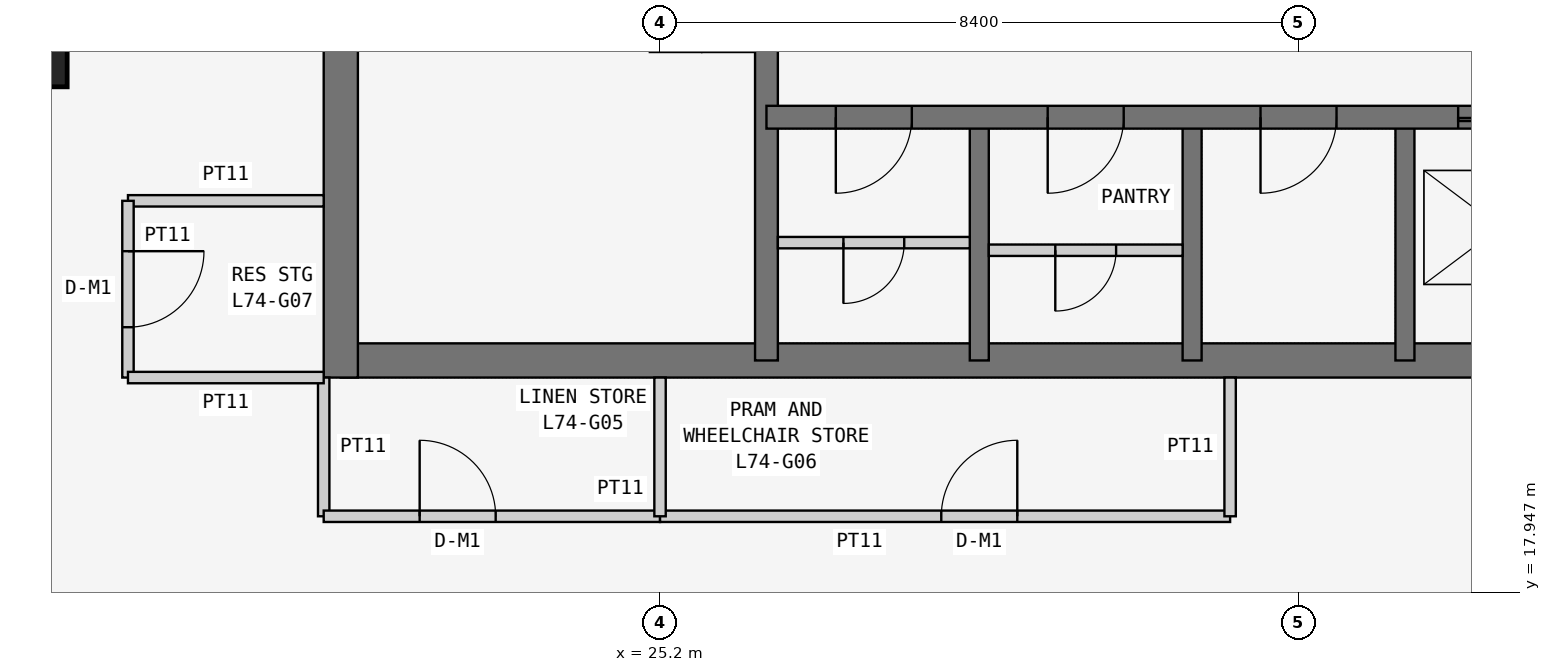
"""IFC4 building model, lengths in metres.
Left out: names, types, materials, properties, quantities, classifications, styles, units other than length and angle.
Written with IfcOpenShell. Run it as: python <this file> out.ifc"""

import sys

from ifc_helpers import new_model, si_unit, direction, frame, frame_2d, origin, origin_2d, place, context, subcontext, project, spatial, rectangle, extrude, element, fill, save


model = new_model("IFC4")
c1 = context("Model", 3, precision=1e-05, world=origin(), true_north=direction((0.0, 1.0)))
c2 = subcontext(c1, "Body", "Model", "MODEL_VIEW")
j1 = project(units=[si_unit("LENGTHUNIT", "METRE"), si_unit("PLANEANGLEUNIT", "RADIAN")], contexts=[c1])
p1 = place(None, origin())
s1 = spatial("IfcSite", under=j1, at=p1, CompositionType="ELEMENT")
p2 = place(p1, origin())
s2 = spatial("IfcBuilding", under=s1, at=p2, CompositionType="ELEMENT")
p3 = place(p2, frame((0.0, 0.0, 282.9)))
s3 = spatial("IfcBuildingStorey", under=s2, at=p3, CompositionType="ELEMENT", Elevation=282.9)
p4 = place(p3, frame((16.8, 25.2, 0.0), z_axis=(0.0, 0.0, 1.0), x_axis=(1.0, 0.0, 0.0)))
e1 = element("IfcColumn", 1, at=p4, inside=s3, PredefinedType="COLUMN", context=c2, shape_type="SweptSolid", body=[
    extrude(rectangle(XDim=1.2, YDim=1.2, at=origin_2d()), origin(), (0.0, 0.0, 1.0), 3.6),
])
p5 = place(p3, frame((21.0, 21.0, 0.0), z_axis=(0.0, 0.0, 1.0), x_axis=(1.0, 0.0, 0.0)))
e2 = element("IfcWall", 2, at=p5, inside=s3, PredefinedType="SHEAR", context=c2, shape_type="SweptSolid", body=[
    extrude(rectangle(XDim=17.025, YDim=0.45, at=frame_2d((8.512, 0.0))), origin(), (0.0, 0.0, 1.0), 3.6),
])
p6 = place(p3, frame((21.0, 37.8, 0.0), z_axis=(0.0, 0.0, 1.0), x_axis=(0.0, -1.0, 0.0)))
e3 = element("IfcWall", 3, at=p6, inside=s3, PredefinedType="SHEAR", context=c2, shape_type="SweptSolid", body=[
    extrude(rectangle(XDim=17.025, YDim=0.45, at=frame_2d((8.513, 0.0))), origin(), (0.0, 0.0, 1.0), 3.6),
])
p7 = place(p6, frame((5.4, 0.0, 0.0)))
e4 = element("IfcOpeningElement", 4, at=p7, cuts=e3, PredefinedType="OPENING", context=c2, shape_type="SweptSolid", body=[
    extrude(rectangle(XDim=1.2, YDim=2.1, at=frame_2d((0.6, 1.05))), frame((0.0, 0.235, 0.0), z_axis=(0.0, -1.0, 0.0), x_axis=(1.0, 0.0, 0.0)), (0.0, 0.0, 1.0), 0.47),
])
p8 = place(p3, frame((26.6, 21.0, 0.0), z_axis=(0.0, 0.0, 1.0), x_axis=(0.0, 1.0, 0.0)))
e5 = element("IfcWall", 5, at=p8, inside=s3, PredefinedType="SHEAR", context=c2, shape_type="SweptSolid", body=[
    extrude(rectangle(XDim=16.8, YDim=0.3, at=frame_2d((8.4, 0.0))), origin(), (0.0, 0.0, 1.0), 3.6),
])
p9 = place(p8, frame((10.4, 0.0, 0.0)))
e6 = element("IfcOpeningElement", 6, at=p9, cuts=e5, PredefinedType="OPENING", context=c2, shape_type="SweptSolid", body=[
    extrude(rectangle(XDim=1.2, YDim=2.1, at=frame_2d((0.6, 1.05))), frame((0.0, 0.16, 0.0), z_axis=(0.0, -1.0, 0.0), x_axis=(1.0, 0.0, 0.0)), (0.0, 0.0, 1.0), 0.32),
])
p10 = place(p3, frame((26.6, 24.2, 0.0), z_axis=(0.0, 0.0, 1.0), x_axis=(1.0, 0.0, 0.0)))
e7 = element("IfcWall", 7, at=p10, inside=s3, PredefinedType="SHEAR", context=c2, shape_type="SweptSolid", body=[
    extrude(rectangle(XDim=11.2, YDim=0.3, at=frame_2d((5.6, 0.0))), origin(), (0.0, 0.0, 1.0), 3.6),
])
p11 = place(p10, frame((0.913, 0.0, 0.0)))
e8 = element("IfcOpeningElement", 8, at=p11, cuts=e7, PredefinedType="OPENING", context=c2, shape_type="SweptSolid", body=[
    extrude(rectangle(XDim=1.0, YDim=2.1, at=frame_2d((0.5, 1.05))), frame((0.0, 0.16, 0.0), z_axis=(0.0, -1.0, 0.0), x_axis=(1.0, 0.0, 0.0)), (0.0, 0.0, 1.0), 0.32),
])
p12 = place(p10, frame((3.7, 0.0, 0.0)))
e9 = element("IfcOpeningElement", 9, at=p12, cuts=e7, PredefinedType="OPENING", context=c2, shape_type="SweptSolid", body=[
    extrude(rectangle(XDim=1.0, YDim=2.1, at=frame_2d((0.5, 1.05))), frame((0.0, 0.16, 0.0), z_axis=(0.0, -1.0, 0.0), x_axis=(1.0, 0.0, 0.0)), (0.0, 0.0, 1.0), 0.32),
])
p13 = place(p10, frame((6.5, 0.0, 0.0)))
e10 = element("IfcOpeningElement", 10, at=p13, cuts=e7, PredefinedType="OPENING", context=c2, shape_type="SweptSolid", body=[
    extrude(rectangle(XDim=1.0, YDim=2.1, at=frame_2d((0.5, 1.05))), frame((0.0, 0.16, 0.0), z_axis=(0.0, -1.0, 0.0), x_axis=(1.0, 0.0, 0.0)), (0.0, 0.0, 1.0), 0.32),
])
p14 = place(p10, frame((9.1, 0.0, 0.0)))
e11 = element("IfcOpeningElement", 11, at=p14, cuts=e7, PredefinedType="OPENING", context=c2, shape_type="SweptSolid", body=[
    extrude(rectangle(XDim=1.1, YDim=2.1, at=frame_2d((0.55, 1.05))), frame((0.0, 0.16, 0.0), z_axis=(0.0, -1.0, 0.0), x_axis=(1.0, 0.0, 0.0)), (0.0, 0.0, 1.0), 0.32),
])
for number, where, z_axis, x_axis in (
    (12, (29.4, 21.0, 0.0), (0.0, 0.0, 1.0), (0.0, 1.0, 0.0)),
    (13, (32.2, 21.0, 0.0), (0.0, 0.0, 1.0), (0.0, 1.0, 0.0)),
    (14, (35.0, 21.0, 0.0), (0.0, 0.0, 1.0), (0.0, 1.0, 0.0)),
):
    element("IfcWall", number, at=place(p3, frame(where, z_axis=z_axis, x_axis=x_axis)), inside=s3, PredefinedType="SHEAR", context=c2, shape_type="SweptSolid", body=[
        extrude(rectangle(XDim=3.2, YDim=0.25, at=frame_2d((1.6, 0.0))), origin(), (0.0, 0.0, 1.0), 3.6),
    ])
p15 = place(p3, frame((20.775, 20.775, 0.0), z_axis=(0.0, 0.0, 1.0), x_axis=(0.0, -1.0, 0.0)))
e15 = element("IfcWall", 15, at=p15, inside=s3, PredefinedType="PARTITIONING", context=c2, shape_type="SweptSolid", body=[
    extrude(rectangle(XDim=1.825, YDim=0.15, at=frame_2d((0.913, 0.0))), origin(), (0.0, 0.0, 1.0), 3.45),
])
p16 = place(p3, frame((20.775, 18.95, 0.0), z_axis=(0.0, 0.0, 1.0), x_axis=(1.0, 0.0, 0.0)))
e16 = element("IfcWall", 16, at=p16, inside=s3, PredefinedType="PARTITIONING", context=c2, shape_type="SweptSolid", body=[
    extrude(rectangle(XDim=4.425, YDim=0.15, at=frame_2d((2.212, 0.0))), origin(), (0.0, 0.0, 1.0), 3.45),
])
p17 = place(p16, frame((1.262, 0.0, 0.0)))
e17 = element("IfcOpeningElement", 17, at=p17, cuts=e16, PredefinedType="OPENING", context=c2, shape_type="SweptSolid", body=[
    extrude(rectangle(XDim=1.0, YDim=2.1, at=frame_2d((0.5, 1.05))), frame((0.0, 0.085, 0.0), z_axis=(0.0, -1.0, 0.0), x_axis=(1.0, 0.0, 0.0)), (0.0, 0.0, 1.0), 0.17),
])
p18 = place(p3, frame((25.2, 18.95, 0.0), z_axis=(0.0, 0.0, 1.0), x_axis=(1.0, 0.0, 0.0)))
e18 = element("IfcWall", 18, at=p18, inside=s3, PredefinedType="PARTITIONING", context=c2, shape_type="SweptSolid", body=[
    extrude(rectangle(XDim=7.5, YDim=0.15, at=frame_2d((3.75, 0.0))), origin(), (0.0, 0.0, 1.0), 3.45),
])
p19 = place(p18, frame((3.7, 0.0, 0.0)))
e19 = element("IfcOpeningElement", 19, at=p19, cuts=e18, PredefinedType="OPENING", context=c2, shape_type="SweptSolid", body=[
    extrude(rectangle(XDim=1.0, YDim=2.1, at=frame_2d((0.5, 1.05))), frame((0.0, 0.085, 0.0), z_axis=(0.0, -1.0, 0.0), x_axis=(1.0, 0.0, 0.0)), (0.0, 0.0, 1.0), 0.17),
])
p20 = place(p3, frame((32.7, 18.95, 0.0), z_axis=(0.0, 0.0, 1.0), x_axis=(0.0, 1.0, 0.0)))
e20 = element("IfcWall", 20, at=p20, inside=s3, PredefinedType="PARTITIONING", context=c2, shape_type="SweptSolid", body=[
    extrude(rectangle(XDim=1.825, YDim=0.15, at=frame_2d((0.913, 0.0))), origin(), (0.0, 0.0, 1.0), 3.45),
])
p21 = place(p3, frame((20.775, 23.1, 0.0), z_axis=(0.0, 0.0, 1.0), x_axis=(-1.0, 0.0, 0.0)))
e21 = element("IfcWall", 21, at=p21, inside=s3, PredefinedType="PARTITIONING", context=c2, shape_type="SweptSolid", body=[
    extrude(rectangle(XDim=2.575, YDim=0.15, at=frame_2d((1.288, 0.0))), origin(), (0.0, 0.0, 1.0), 3.45),
])
p22 = place(p3, frame((18.2, 23.1, 0.0), z_axis=(0.0, 0.0, 1.0), x_axis=(0.0, -1.0, 0.0)))
e22 = element("IfcWall", 22, at=p22, inside=s3, PredefinedType="PARTITIONING", context=c2, shape_type="SweptSolid", body=[
    extrude(rectangle(XDim=2.325, YDim=0.15, at=frame_2d((1.163, 0.0))), origin(), (0.0, 0.0, 1.0), 3.45),
])
p23 = place(p22, frame((0.663, 0.0, 0.0)))
e23 = element("IfcOpeningElement", 23, at=p23, cuts=e22, PredefinedType="OPENING", context=c2, shape_type="SweptSolid", body=[
    extrude(rectangle(XDim=1.0, YDim=2.1, at=frame_2d((0.5, 1.05))), frame((0.0, 0.085, 0.0), z_axis=(0.0, -1.0, 0.0), x_axis=(1.0, 0.0, 0.0)), (0.0, 0.0, 1.0), 0.17),
])
p24 = place(p3, frame((18.2, 20.775, 0.0), z_axis=(0.0, 0.0, 1.0), x_axis=(1.0, 0.0, 0.0)))
e24 = element("IfcWall", 24, at=p24, inside=s3, PredefinedType="PARTITIONING", context=c2, shape_type="SweptSolid", body=[
    extrude(rectangle(XDim=2.575, YDim=0.15, at=frame_2d((1.288, 0.0))), origin(), (0.0, 0.0, 1.0), 3.45),
])
p25 = place(p3, frame((25.2, 18.95, 0.0), z_axis=(0.0, 0.0, 1.0), x_axis=(0.0, 1.0, 0.0)))
e25 = element("IfcWall", 25, at=p25, inside=s3, PredefinedType="PARTITIONING", context=c2, shape_type="SweptSolid", body=[
    extrude(rectangle(XDim=1.825, YDim=0.15, at=frame_2d((0.913, 0.0))), origin(), (0.0, 0.0, 1.0), 2.767),
])
p26 = place(p3, frame((26.75, 22.55, 0.0), z_axis=(0.0, 0.0, 1.0), x_axis=(1.0, 0.0, 0.0)))
e26 = element("IfcWall", 26, at=p26, inside=s3, PredefinedType="PARTITIONING", context=c2, shape_type="SweptSolid", body=[
    extrude(rectangle(XDim=2.525, YDim=0.15, at=frame_2d((1.262, 0.0))), origin(), (0.0, 0.0, 1.0), 3.45),
])
p27 = place(p26, frame((0.863, 0.0, 0.0)))
e27 = element("IfcOpeningElement", 27, at=p27, cuts=e26, PredefinedType="OPENING", context=c2, shape_type="SweptSolid", body=[
    extrude(rectangle(XDim=0.8, YDim=2.1, at=frame_2d((0.4, 1.05))), frame((0.0, 0.085, 0.0), z_axis=(0.0, -1.0, 0.0), x_axis=(1.0, 0.0, 0.0)), (0.0, 0.0, 1.0), 0.17),
])
p28 = place(p3, frame((29.525, 22.45, 0.0), z_axis=(0.0, 0.0, 1.0), x_axis=(1.0, 0.0, 0.0)))
e28 = element("IfcWall", 28, at=p28, inside=s3, PredefinedType="PARTITIONING", context=c2, shape_type="SweptSolid", body=[
    extrude(rectangle(XDim=2.55, YDim=0.15, at=frame_2d((1.275, 0.0))), origin(), (0.0, 0.0, 1.0), 3.45),
])
p29 = place(p28, frame((0.875, 0.0, 0.0)))
e29 = element("IfcOpeningElement", 29, at=p29, cuts=e28, PredefinedType="OPENING", context=c2, shape_type="SweptSolid", body=[
    extrude(rectangle(XDim=0.8, YDim=2.1, at=frame_2d((0.4, 1.05))), frame((0.0, 0.085, 0.0), z_axis=(0.0, -1.0, 0.0), x_axis=(1.0, 0.0, 0.0)), (0.0, 0.0, 1.0), 0.17),
])
p30 = place(p17, origin())
e30 = element("IfcDoor", 30, at=p30, inside=s3, OperationType="SINGLE_SWING_LEFT", PredefinedType="DOOR", context=c2, shape_type="SweptSolid", body=[
    extrude(rectangle(XDim=1.0, YDim=2.1, at=frame_2d((0.5, 1.05))), frame((0.0, 0.025, 0.0), z_axis=(0.0, -1.0, 0.0), x_axis=(1.0, 0.0, 0.0)), (0.0, 0.0, 1.0), 0.05),
])
fill(e17, e30)
p31 = place(p19, origin())
e31 = element("IfcDoor", 31, at=p31, inside=s3, OperationType="SINGLE_SWING_RIGHT", PredefinedType="DOOR", context=c2, shape_type="SweptSolid", body=[
    extrude(rectangle(XDim=1.0, YDim=2.1, at=frame_2d((0.5, 1.05))), frame((0.0, 0.025, 0.0), z_axis=(0.0, -1.0, 0.0), x_axis=(1.0, 0.0, 0.0)), (0.0, 0.0, 1.0), 0.05),
])
fill(e19, e31)
p32 = place(p23, origin())
e32 = element("IfcDoor", 32, at=p32, inside=s3, OperationType="SINGLE_SWING_LEFT", PredefinedType="DOOR", context=c2, shape_type="SweptSolid", body=[
    extrude(rectangle(XDim=1.0, YDim=2.1, at=frame_2d((0.5, 1.05))), frame((0.0, 0.025, 0.0), z_axis=(0.0, -1.0, 0.0), x_axis=(1.0, 0.0, 0.0)), (0.0, 0.0, 1.0), 0.05),
])
fill(e23, e32)
p33 = place(p11, frame((1.0, 0.0, 0.0), z_axis=(0.0, 0.0, 1.0), x_axis=(-1.0, 0.0, 0.0)))
e33 = element("IfcDoor", 33, at=p33, inside=s3, OperationType="SINGLE_SWING_RIGHT", PredefinedType="DOOR", context=c2, shape_type="SweptSolid", body=[
    extrude(rectangle(XDim=1.0, YDim=2.1, at=frame_2d((0.5, 1.05))), frame((0.0, 0.025, 0.0), z_axis=(0.0, -1.0, 0.0), x_axis=(1.0, 0.0, 0.0)), (0.0, 0.0, 1.0), 0.05),
])
fill(e8, e33)
p34 = place(p27, frame((0.8, 0.0, 0.0), z_axis=(0.0, 0.0, 1.0), x_axis=(-1.0, 0.0, 0.0)))
e34 = element("IfcDoor", 34, at=p34, inside=s3, OperationType="SINGLE_SWING_RIGHT", PredefinedType="DOOR", context=c2, shape_type="SweptSolid", body=[
    extrude(rectangle(XDim=0.8, YDim=2.1, at=frame_2d((0.4, 1.05))), frame((0.0, 0.025, 0.0), z_axis=(0.0, -1.0, 0.0), x_axis=(1.0, 0.0, 0.0)), (0.0, 0.0, 1.0), 0.05),
])
fill(e27, e34)
p35 = place(p12, frame((1.0, 0.0, 0.0), z_axis=(0.0, 0.0, 1.0), x_axis=(-1.0, 0.0, 0.0)))
e35 = element("IfcDoor", 35, at=p35, inside=s3, OperationType="SINGLE_SWING_RIGHT", PredefinedType="DOOR", context=c2, shape_type="SweptSolid", body=[
    extrude(rectangle(XDim=1.0, YDim=2.1, at=frame_2d((0.5, 1.05))), frame((0.0, 0.025, 0.0), z_axis=(0.0, -1.0, 0.0), x_axis=(1.0, 0.0, 0.0)), (0.0, 0.0, 1.0), 0.05),
])
fill(e9, e35)
p36 = place(p29, frame((0.8, 0.0, 0.0), z_axis=(0.0, 0.0, 1.0), x_axis=(-1.0, 0.0, 0.0)))
e36 = element("IfcDoor", 36, at=p36, inside=s3, OperationType="SINGLE_SWING_RIGHT", PredefinedType="DOOR", context=c2, shape_type="SweptSolid", body=[
    extrude(rectangle(XDim=0.8, YDim=2.1, at=frame_2d((0.4, 1.05))), frame((0.0, 0.025, 0.0), z_axis=(0.0, -1.0, 0.0), x_axis=(1.0, 0.0, 0.0)), (0.0, 0.0, 1.0), 0.05),
])
fill(e29, e36)
p37 = place(p13, frame((1.0, 0.0, 0.0), z_axis=(0.0, 0.0, 1.0), x_axis=(-1.0, 0.0, 0.0)))
e37 = element("IfcDoor", 37, at=p37, inside=s3, OperationType="SINGLE_SWING_RIGHT", PredefinedType="DOOR", context=c2, shape_type="SweptSolid", body=[
    extrude(rectangle(XDim=1.0, YDim=2.1, at=frame_2d((0.5, 1.05))), frame((0.0, 0.025, 0.0), z_axis=(0.0, -1.0, 0.0), x_axis=(1.0, 0.0, 0.0)), (0.0, 0.0, 1.0), 0.05),
])
fill(e10, e37)
p38 = place(p14, origin())
e38 = element("IfcDoor", 38, at=p38, inside=s3, OperationType="DOUBLE_DOOR_SLIDING", PredefinedType="DOOR", context=c2, shape_type="SweptSolid", body=[
    extrude(rectangle(XDim=1.1, YDim=2.1, at=frame_2d((0.55, 1.05))), frame((0.0, 0.025, 0.0), z_axis=(0.0, -1.0, 0.0), x_axis=(1.0, 0.0, 0.0)), (0.0, 0.0, 1.0), 0.05),
])
fill(e11, e38)
save(model, sys.argv[1])
